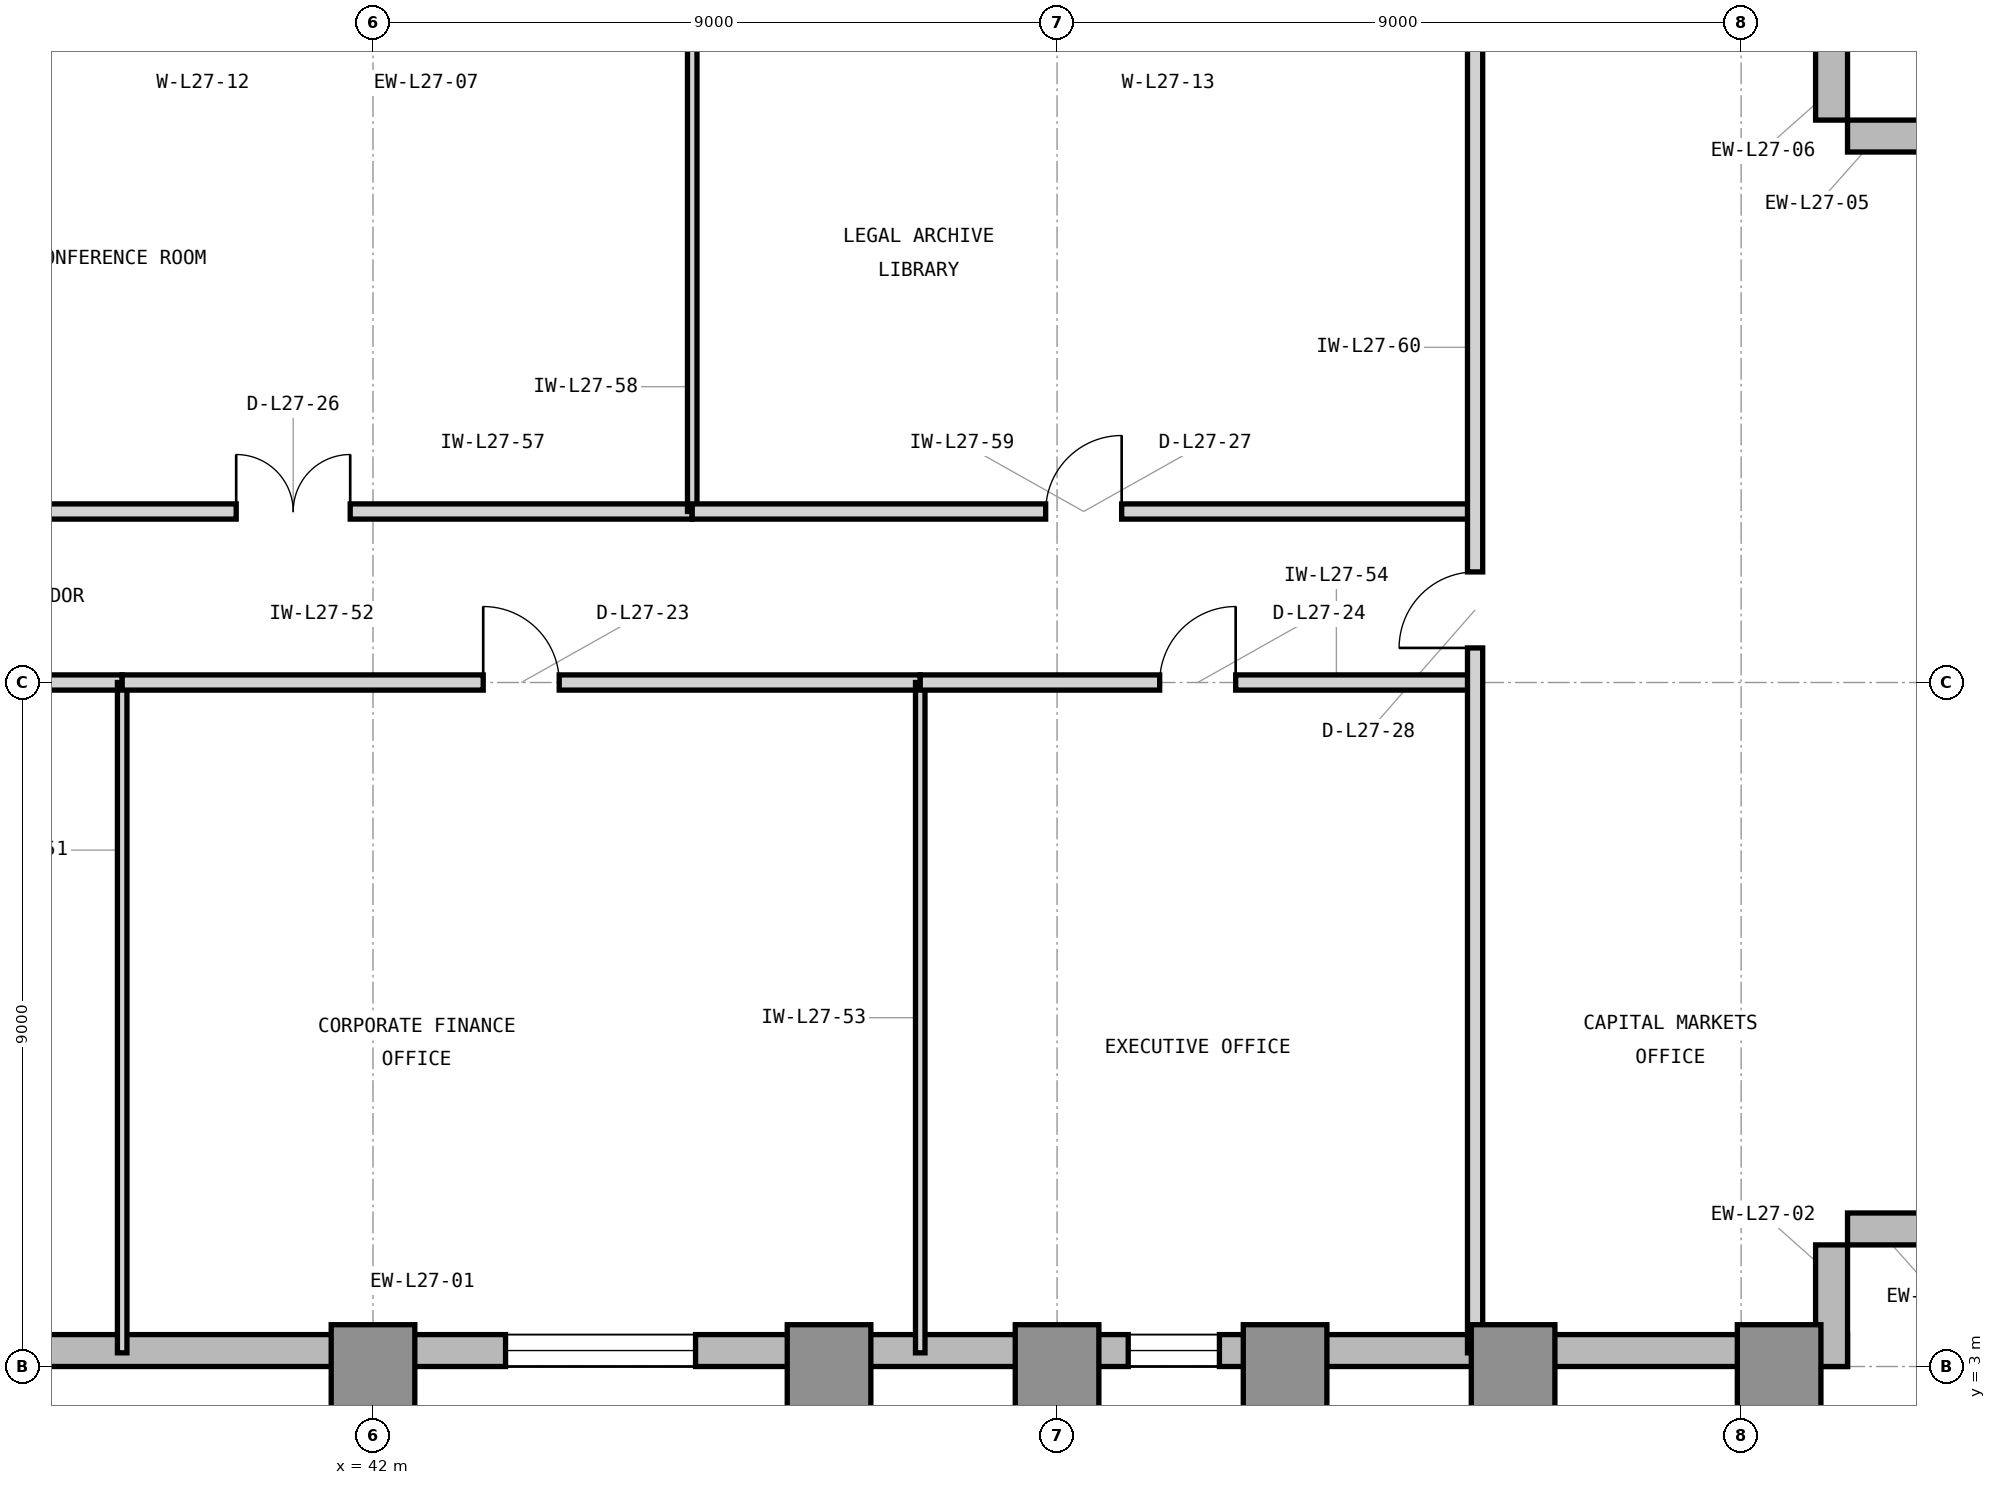
"""IFC4 building model, lengths in metres.
Left out: names, types, materials, properties, quantities, classifications, styles, units other than length and angle.
Written with IfcOpenShell. Run it as: python <this file> out.ifc"""

import sys

from ifc_helpers import new_model, si_unit, direction, frame, frame_2d, origin, origin_2d, place, context, subcontext, project, spatial, rectangle, extrude, element, fill, save


model = new_model("IFC4")
c1 = context("Model", 3, precision=1e-05, world=origin(), true_north=direction((0.0, 1.0)))
c2 = subcontext(c1, "Body", "Model", "MODEL_VIEW")
j1 = project(units=[si_unit("LENGTHUNIT", "METRE"), si_unit("PLANEANGLEUNIT", "RADIAN")], contexts=[c1])
p1 = place(None, origin())
s1 = spatial("IfcSite", under=j1, at=p1, CompositionType="ELEMENT")
p2 = place(p1, origin())
s2 = spatial("IfcBuilding", under=s1, at=p2, CompositionType="ELEMENT")
p3 = place(p2, frame((0.0, 0.0, 116.7)))
s3 = spatial("IfcBuildingStorey", under=s2, at=p3, CompositionType="ELEMENT", Elevation=116.7)
for number, where, z_axis, x_axis in (
    (1, (42.0, 3.0, 0.0), (0.0, 0.0, 1.0), (1.0, 0.0, 0.0)),
    (2, (48.0, 3.0, 0.0), (0.0, 0.0, 1.0), (1.0, 0.0, 0.0)),
    (3, (51.0, 3.0, 0.0), (0.0, 0.0, 1.0), (1.0, 0.0, 0.0)),
    (4, (54.0, 3.0, 0.0), (0.0, 0.0, 1.0), (1.0, 0.0, 0.0)),
    (5, (57.0, 3.0, 0.0), (0.0, 0.0, 1.0), (1.0, 0.0, 0.0)),
    (6, (60.5, 3.0, 0.0), (0.0, 0.0, 1.0), (1.0, 0.0, 0.0)),
):
    element("IfcColumn", number, at=place(p3, frame(where, z_axis=z_axis, x_axis=x_axis)), inside=s3, PredefinedType="COLUMN", context=c2, shape_type="SweptSolid", body=[
        extrude(rectangle(XDim=1.1, YDim=1.1, at=origin_2d()), origin(), (0.0, 0.0, 1.0), 3.9),
    ])
p4 = place(p3, frame((23.9, 3.21, 0.0), z_axis=(0.0, 0.0, 1.0), x_axis=(1.0, 0.0, 0.0)))
e7 = element("IfcWall", 7, at=p4, inside=s3, PredefinedType="STANDARD", context=c2, shape_type="SweptSolid", body=[
    extrude(rectangle(XDim=37.5, YDim=0.42, at=frame_2d((18.75, 0.0))), origin(), (0.0, 0.0, 1.0), 3.7),
])
p5 = place(p4, frame((10.469, 0.0, 0.85)))
e8 = element("IfcOpeningElement", 8, at=p5, cuts=e7, PredefinedType="OPENING", context=c2, shape_type="SweptSolid", body=[
    extrude(rectangle(XDim=2.5, YDim=2.25, at=frame_2d((1.25, 1.125))), frame((0.0, 0.22, 0.0), z_axis=(0.0, -1.0, 0.0), x_axis=(1.0, 0.0, 0.0)), (0.0, 0.0, 1.0), 0.44),
])
p6 = place(p4, frame((19.844, 0.0, 0.85)))
e9 = element("IfcOpeningElement", 9, at=p6, cuts=e7, PredefinedType="OPENING", context=c2, shape_type="SweptSolid", body=[
    extrude(rectangle(XDim=2.5, YDim=2.25, at=frame_2d((1.25, 1.125))), frame((0.0, 0.22, 0.0), z_axis=(0.0, -1.0, 0.0), x_axis=(1.0, 0.0, 0.0)), (0.0, 0.0, 1.0), 0.44),
])
p7 = place(p4, frame((1.1, 0.0, 0.85)))
e10 = element("IfcOpeningElement", 10, at=p7, cuts=e7, PredefinedType="OPENING", context=c2, shape_type="SweptSolid", body=[
    extrude(rectangle(XDim=1.2, YDim=2.25, at=frame_2d((0.6, 1.125))), frame((0.0, 0.22, 0.0), z_axis=(0.0, -1.0, 0.0), x_axis=(1.0, 0.0, 0.0)), (0.0, 0.0, 1.0), 0.44),
])
p8 = place(p4, frame((28.036, 0.0, 0.85)))
e11 = element("IfcOpeningElement", 11, at=p8, cuts=e7, PredefinedType="OPENING", context=c2, shape_type="SweptSolid", body=[
    extrude(rectangle(XDim=1.2, YDim=2.25, at=frame_2d((0.6, 1.125))), frame((0.0, 0.22, 0.0), z_axis=(0.0, -1.0, 0.0), x_axis=(1.0, 0.0, 0.0)), (0.0, 0.0, 1.0), 0.44),
])
for number, where, z_axis, x_axis in (
    (12, (61.19, 3.0, 0.0), (0.0, 0.0, 1.0), (0.0, 1.0, 0.0)),
    (13, (61.4, 4.81, 0.0), (0.0, 0.0, 1.0), (1.0, 0.0, 0.0)),
    (14, (63.0, 19.19, 0.0), (0.0, 0.0, 1.0), (-1.0, 0.0, 0.0)),
    (15, (61.19, 19.4, 0.0), (0.0, 0.0, 1.0), (0.0, 1.0, 0.0)),
):
    element("IfcWall", number, at=place(p3, frame(where, z_axis=z_axis, x_axis=x_axis)), inside=s3, PredefinedType="STANDARD", context=c2, shape_type="SweptSolid", body=[
        extrude(rectangle(XDim=1.6, YDim=0.42, at=frame_2d((0.8, 0.0))), origin(), (0.0, 0.0, 1.0), 3.7),
    ])
p9 = place(p3, frame((26.7, 12.0, 0.0), z_axis=(0.0, 0.0, 1.0), x_axis=(1.0, 0.0, 0.0)))
e16 = element("IfcWall", 16, at=p9, inside=s3, PredefinedType="PARTITIONING", context=c2, shape_type="SweptSolid", body=[
    extrude(rectangle(XDim=12.0, YDim=0.2, at=frame_2d((6.0, 0.0))), origin(), (0.0, 0.0, 1.0), 3.227),
])
p10 = place(p9, frame((5.5, 0.0, 0.0)))
e17 = element("IfcOpeningElement", 17, at=p10, cuts=e16, PredefinedType="OPENING", context=c2, shape_type="SweptSolid", body=[
    extrude(rectangle(XDim=1.0, YDim=2.15, at=frame_2d((0.5, 1.075))), frame((0.0, 0.11, 0.0), z_axis=(0.0, -1.0, 0.0), x_axis=(1.0, 0.0, 0.0)), (0.0, 0.0, 1.0), 0.22),
])
p11 = place(p3, frame((38.7, 3.18, 0.0), z_axis=(0.0, 0.0, 1.0), x_axis=(0.0, 1.0, 0.0)))
e18 = element("IfcWall", 18, at=p11, inside=s3, PredefinedType="PARTITIONING", context=c2, shape_type="SweptSolid", body=[
    extrude(rectangle(XDim=8.82, YDim=0.125, at=frame_2d((4.41, 0.0))), origin(), (0.0, 0.0, 1.0), 3.69),
])
p12 = place(p3, frame((38.7, 12.0, 0.0), z_axis=(0.0, 0.0, 1.0), x_axis=(1.0, 0.0, 0.0)))
e19 = element("IfcWall", 19, at=p12, inside=s3, PredefinedType="PARTITIONING", context=c2, shape_type="SweptSolid", body=[
    extrude(rectangle(XDim=10.5, YDim=0.2, at=frame_2d((5.25, 0.0))), origin(), (0.0, 0.0, 1.0), 3.227),
])
p13 = place(p12, frame((4.75, 0.0, 0.0)))
e20 = element("IfcOpeningElement", 20, at=p13, cuts=e19, PredefinedType="OPENING", context=c2, shape_type="SweptSolid", body=[
    extrude(rectangle(XDim=1.0, YDim=2.15, at=frame_2d((0.5, 1.075))), frame((0.0, 0.11, 0.0), z_axis=(0.0, -1.0, 0.0), x_axis=(1.0, 0.0, 0.0)), (0.0, 0.0, 1.0), 0.22),
])
p14 = place(p3, frame((49.2, 3.18, 0.0), z_axis=(0.0, 0.0, 1.0), x_axis=(0.0, 1.0, 0.0)))
e21 = element("IfcWall", 21, at=p14, inside=s3, PredefinedType="PARTITIONING", context=c2, shape_type="SweptSolid", body=[
    extrude(rectangle(XDim=8.82, YDim=0.125, at=frame_2d((4.41, 0.0))), origin(), (0.0, 0.0, 1.0), 3.69),
])
p15 = place(p3, frame((49.2, 12.0, 0.0), z_axis=(0.0, 0.0, 1.0), x_axis=(1.0, 0.0, 0.0)))
e22 = element("IfcWall", 22, at=p15, inside=s3, PredefinedType="PARTITIONING", context=c2, shape_type="SweptSolid", body=[
    extrude(rectangle(XDim=7.3, YDim=0.2, at=frame_2d((3.65, 0.0))), origin(), (0.0, 0.0, 1.0), 3.227),
])
p16 = place(p15, frame((3.15, 0.0, 0.0)))
e23 = element("IfcOpeningElement", 23, at=p16, cuts=e22, PredefinedType="OPENING", context=c2, shape_type="SweptSolid", body=[
    extrude(rectangle(XDim=1.0, YDim=2.15, at=frame_2d((0.5, 1.075))), frame((0.0, 0.11, 0.0), z_axis=(0.0, -1.0, 0.0), x_axis=(1.0, 0.0, 0.0)), (0.0, 0.0, 1.0), 0.22),
])
p17 = place(p3, frame((35.7, 14.25, 0.0), z_axis=(0.0, 0.0, 1.0), x_axis=(1.0, 0.0, 0.0)))
e24 = element("IfcWall", 24, at=p17, inside=s3, PredefinedType="PARTITIONING", context=c2, shape_type="SweptSolid", body=[
    extrude(rectangle(XDim=10.5, YDim=0.2, at=frame_2d((5.25, 0.0))), origin(), (0.0, 0.0, 1.0), 3.69),
])
p18 = place(p17, frame((4.5, 0.0, 0.0)))
e25 = element("IfcOpeningElement", 25, at=p18, cuts=e24, PredefinedType="OPENING", context=c2, shape_type="SweptSolid", body=[
    extrude(rectangle(XDim=1.5, YDim=2.3, at=frame_2d((0.75, 1.15))), frame((0.0, 0.11, 0.0), z_axis=(0.0, -1.0, 0.0), x_axis=(1.0, 0.0, 0.0)), (0.0, 0.0, 1.0), 0.22),
])
p19 = place(p3, frame((46.2, 14.25, 0.0), z_axis=(0.0, 0.0, 1.0), x_axis=(0.0, 1.0, 0.0)))
e26 = element("IfcWall", 26, at=p19, inside=s3, PredefinedType="PARTITIONING", context=c2, shape_type="SweptSolid", body=[
    extrude(rectangle(XDim=6.57, YDim=0.125, at=frame_2d((3.285, 0.0))), origin(), (0.0, 0.0, 1.0), 3.69),
])
p20 = place(p3, frame((46.2, 14.25, 0.0), z_axis=(0.0, 0.0, 1.0), x_axis=(1.0, 0.0, 0.0)))
e27 = element("IfcWall", 27, at=p20, inside=s3, PredefinedType="PARTITIONING", context=c2, shape_type="SweptSolid", body=[
    extrude(rectangle(XDim=10.3, YDim=0.2, at=frame_2d((5.15, 0.0))), origin(), (0.0, 0.0, 1.0), 3.69),
])
p21 = place(p20, frame((4.65, 0.0, 0.0)))
e28 = element("IfcOpeningElement", 28, at=p21, cuts=e27, PredefinedType="OPENING", context=c2, shape_type="SweptSolid", body=[
    extrude(rectangle(XDim=1.0, YDim=2.15, at=frame_2d((0.5, 1.075))), frame((0.0, 0.11, 0.0), z_axis=(0.0, -1.0, 0.0), x_axis=(1.0, 0.0, 0.0)), (0.0, 0.0, 1.0), 0.22),
])
p22 = place(p3, frame((56.5, 3.18, 0.0), z_axis=(0.0, 0.0, 1.0), x_axis=(0.0, 1.0, 0.0)))
e29 = element("IfcWall", 29, at=p22, inside=s3, PredefinedType="PARTITIONING", context=c2, shape_type="SweptSolid", body=[
    extrude(rectangle(XDim=17.64, YDim=0.2, at=frame_2d((8.82, 0.0))), origin(), (0.0, 0.0, 1.0), 3.69),
])
p23 = place(p22, frame((9.275, 0.0, 0.0)))
e30 = element("IfcOpeningElement", 30, at=p23, cuts=e29, PredefinedType="OPENING", context=c2, shape_type="SweptSolid", body=[
    extrude(rectangle(XDim=1.0, YDim=2.15, at=frame_2d((0.5, 1.075))), frame((0.0, 0.11, 0.0), z_axis=(0.0, -1.0, 0.0), x_axis=(1.0, 0.0, 0.0)), (0.0, 0.0, 1.0), 0.22),
])
p24 = place(p6, origin())
e31 = element("IfcWindow", 31, at=p24, inside=s3, PartitioningType="SINGLE_PANEL", PredefinedType="WINDOW", context=c2, shape_type="SweptSolid", body=[
    extrude(rectangle(XDim=2.5, YDim=2.25, at=frame_2d((1.25, 1.125))), frame((0.0, 0.11, 0.0), z_axis=(0.0, -1.0, 0.0), x_axis=(1.0, 0.0, 0.0)), (0.0, 0.0, 1.0), 0.06),
])
fill(e9, e31)
p25 = place(p13, origin())
e32 = element("IfcDoor", 32, at=p25, inside=s3, OperationType="SINGLE_SWING_LEFT", PredefinedType="DOOR", context=c2, shape_type="SweptSolid", body=[
    extrude(rectangle(XDim=1.0, YDim=2.15, at=frame_2d((0.5, 1.075))), frame((0.0, 0.025, 0.0), z_axis=(0.0, -1.0, 0.0), x_axis=(1.0, 0.0, 0.0)), (0.0, 0.0, 1.0), 0.05),
])
fill(e20, e32)
p26 = place(p16, origin())
e33 = element("IfcDoor", 33, at=p26, inside=s3, OperationType="SINGLE_SWING_RIGHT", PredefinedType="DOOR", context=c2, shape_type="SweptSolid", body=[
    extrude(rectangle(XDim=1.0, YDim=2.15, at=frame_2d((0.5, 1.075))), frame((0.0, 0.025, 0.0), z_axis=(0.0, -1.0, 0.0), x_axis=(1.0, 0.0, 0.0)), (0.0, 0.0, 1.0), 0.05),
])
fill(e23, e33)
p27 = place(p18, origin())
e34 = element("IfcDoor", 34, at=p27, inside=s3, OperationType="DOUBLE_DOOR_SINGLE_SWING", PredefinedType="DOOR", context=c2, shape_type="SweptSolid", body=[
    extrude(rectangle(XDim=1.5, YDim=2.3, at=frame_2d((0.75, 1.15))), frame((0.0, 0.025, 0.0), z_axis=(0.0, -1.0, 0.0), x_axis=(1.0, 0.0, 0.0)), (0.0, 0.0, 1.0), 0.05),
])
fill(e25, e34)
p28 = place(p21, origin())
e35 = element("IfcDoor", 35, at=p28, inside=s3, OperationType="SINGLE_SWING_RIGHT", PredefinedType="DOOR", context=c2, shape_type="SweptSolid", body=[
    extrude(rectangle(XDim=1.0, YDim=2.15, at=frame_2d((0.5, 1.075))), frame((0.0, 0.025, 0.0), z_axis=(0.0, -1.0, 0.0), x_axis=(1.0, 0.0, 0.0)), (0.0, 0.0, 1.0), 0.05),
])
fill(e28, e35)
p29 = place(p23, origin())
e36 = element("IfcDoor", 36, at=p29, inside=s3, OperationType="SINGLE_SWING_LEFT", PredefinedType="DOOR", context=c2, shape_type="SweptSolid", body=[
    extrude(rectangle(XDim=1.0, YDim=2.15, at=frame_2d((0.5, 1.075))), frame((0.0, 0.025, 0.0), z_axis=(0.0, -1.0, 0.0), x_axis=(1.0, 0.0, 0.0)), (0.0, 0.0, 1.0), 0.05),
])
fill(e30, e36)
p30 = place(p8, origin())
e37 = element("IfcWindow", 37, at=p30, inside=s3, PartitioningType="SINGLE_PANEL", PredefinedType="WINDOW", context=c2, shape_type="SweptSolid", body=[
    extrude(rectangle(XDim=1.2, YDim=2.25, at=frame_2d((0.6, 1.125))), frame((0.0, 0.11, 0.0), z_axis=(0.0, -1.0, 0.0), x_axis=(1.0, 0.0, 0.0)), (0.0, 0.0, 1.0), 0.06),
])
fill(e11, e37)
save(model, sys.argv[1])
